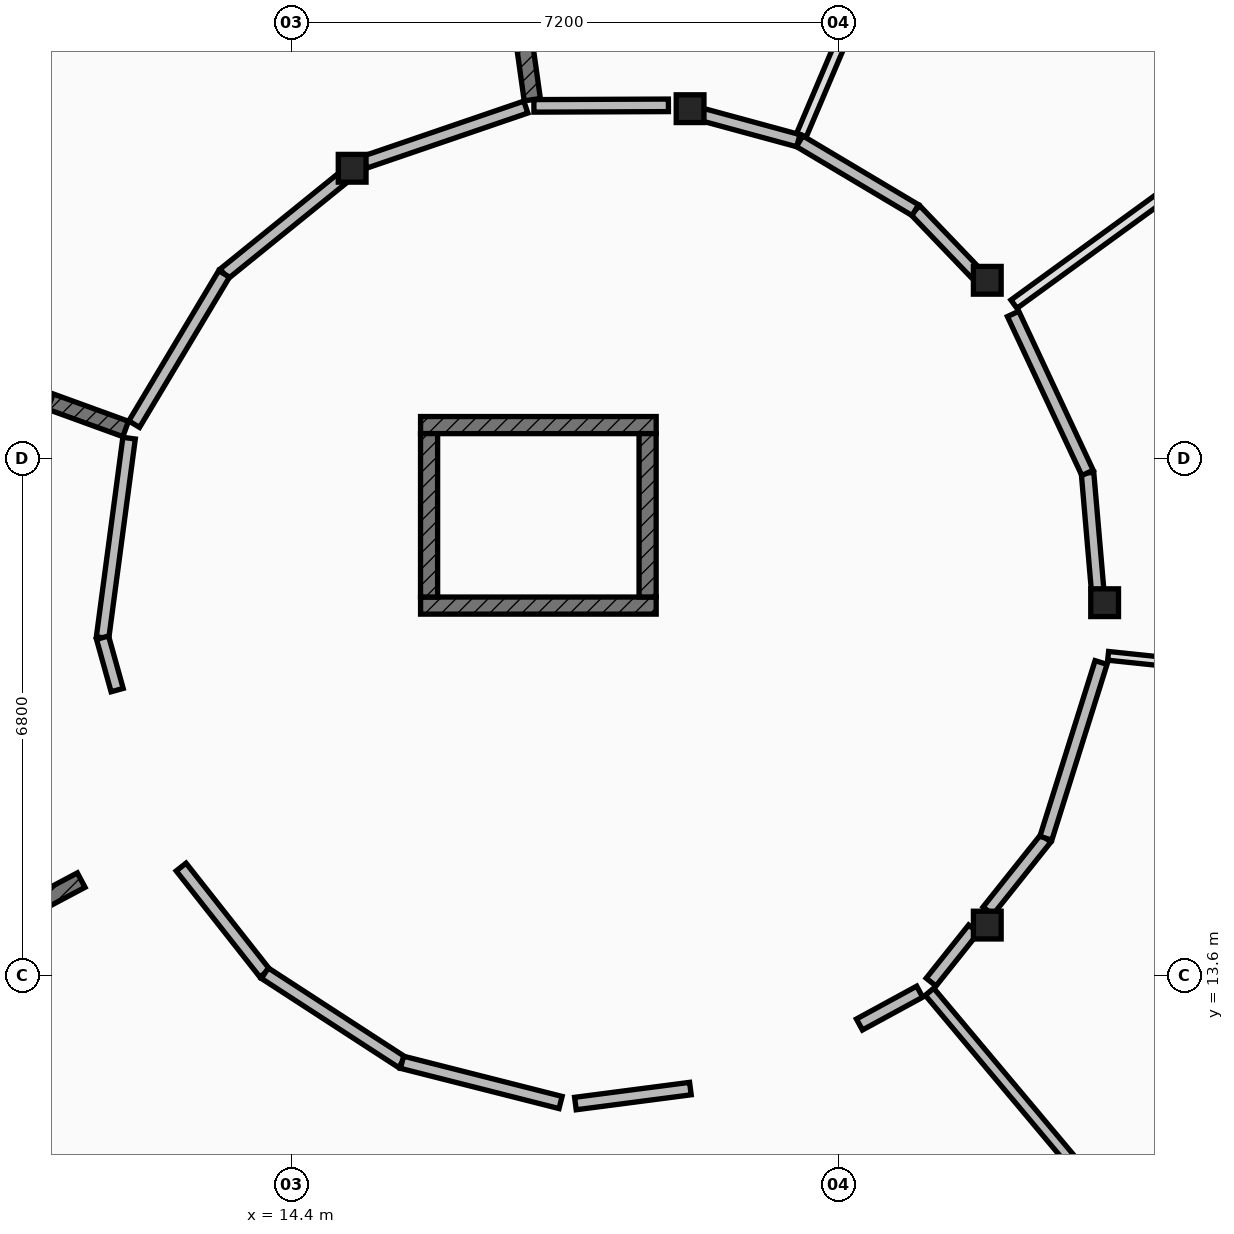
"""IFC4 building model, lengths in metres.
Left out: names, types, materials, properties, quantities, classifications, styles, units other than length and angle.
Written with IfcOpenShell. Run it as: python <this file> out.ifc"""

import sys

from ifc_helpers import new_model, si_unit, direction, frame, frame_2d, origin, origin_2d, place, context, subcontext, project, spatial, rectangle, extrude, element, fill, save


model = new_model("IFC4")
c1 = context("Model", 3, precision=1e-05, world=origin(), true_north=direction((0.0, 1.0)))
c2 = subcontext(c1, "Body", "Model", "MODEL_VIEW")
j1 = project(units=[si_unit("LENGTHUNIT", "METRE"), si_unit("PLANEANGLEUNIT", "RADIAN")], contexts=[c1])
p1 = place(None, origin())
s1 = spatial("IfcSite", under=j1, at=p1, CompositionType="ELEMENT")
p2 = place(p1, origin())
s2 = spatial("IfcBuilding", under=s1, at=p2, CompositionType="ELEMENT")
p3 = place(p2, frame((0.0, 0.0, 8.75)))
s3 = spatial("IfcBuildingStorey", under=s2, at=p3, CompositionType="ELEMENT", Elevation=8.75)
for number, where, z_axis, x_axis in (
    (1, (25.1, 18.5, 0.0), (0.0, 0.0, 1.0), (1.0, 0.0, 0.0)),
    (2, (23.556, 22.742, 0.0), (0.0, 0.0, 1.0), (1.0, 0.0, 0.0)),
    (3, (19.646, 25.0, 0.0), (0.0, 0.0, 1.0), (1.0, 0.0, 0.0)),
    (4, (15.2, 24.216, 0.0), (0.0, 0.0, 1.0), (1.0, 0.0, 0.0)),
    (5, (23.556, 14.258, 0.0), (0.0, 0.0, 1.0), (1.0, 0.0, 0.0)),
):
    element("IfcColumn", number, at=place(p3, frame(where, z_axis=z_axis, x_axis=x_axis)), inside=s3, PredefinedType="COLUMN", context=c2, shape_type="SweptSolid", body=[
        extrude(rectangle(XDim=0.365, YDim=0.365, at=origin_2d()), origin(), (0.0, 0.0, 1.0), 4.2),
    ])
p4 = place(p3, frame((16.1, 18.462, 0.0), z_axis=(0.0, 0.0, 1.0), x_axis=(1.0, 0.0, 0.0)))
e6 = element("IfcWall", 6, at=p4, inside=s3, PredefinedType="SHEAR", context=c2, shape_type="SweptSolid", body=[
    extrude(rectangle(XDim=3.1, YDim=0.225, at=frame_2d((1.55, 0.0))), origin(), (0.0, 0.0, 1.0), 3.975),
])
p5 = place(p4, frame((0.9, 0.0, 0.0)))
e7 = element("IfcOpeningElement", 7, at=p5, cuts=e6, PredefinedType="OPENING", context=c2, shape_type="SweptSolid", body=[
    extrude(rectangle(XDim=1.3, YDim=2.2, at=frame_2d((0.65, 1.1))), frame((0.0, 0.123, 0.0), z_axis=(0.0, -1.0, 0.0), x_axis=(1.0, 0.0, 0.0)), (0.0, 0.0, 1.0), 0.245),
])
p6 = place(p3, frame((16.1, 20.837, 0.0), z_axis=(0.0, 0.0, 1.0), x_axis=(1.0, 0.0, 0.0)))
e8 = element("IfcWall", 8, at=p6, inside=s3, PredefinedType="SHEAR", context=c2, shape_type="SweptSolid", body=[
    extrude(rectangle(XDim=3.1, YDim=0.225, at=frame_2d((1.55, 0.0))), origin(), (0.0, 0.0, 1.0), 3.975),
])
for number, where, z_axis, x_axis in (
    (9, (16.212, 18.575, 0.0), (0.0, 0.0, 1.0), (0.0, 1.0, 0.0)),
    (10, (19.087, 18.575, 0.0), (0.0, 0.0, 1.0), (0.0, 1.0, 0.0)),
):
    element("IfcWall", number, at=place(p3, frame(where, z_axis=z_axis, x_axis=x_axis)), inside=s3, PredefinedType="SHEAR", context=c2, shape_type="SweptSolid", body=[
        extrude(rectangle(XDim=2.15, YDim=0.225, at=frame_2d((1.075, 0.0))), origin(), (0.0, 0.0, 1.0), 3.975),
    ])
p7 = place(p3, frame((17.57, 25.118, 0.0), z_axis=(0.0, 0.0, 1.0), x_axis=(-0.139279606871, 0.990253094471, 0.0)))
e11 = element("IfcWall", 11, at=p7, inside=s3, PredefinedType="SOLIDWALL", context=c2, shape_type="SweptSolid", body=[
    extrude(rectangle(XDim=5.586, YDim=0.215, at=frame_2d((2.793, 0.0))), origin(), (0.0, 0.0, 1.0), 3.304),
])
p8 = place(p3, frame((12.22, 20.786, 0.0), z_axis=(0.0, 0.0, 1.0), x_axis=(-0.939759586286, 0.341836101053, 0.0)))
e12 = element("IfcWall", 12, at=p8, inside=s3, PredefinedType="SOLIDWALL", context=c2, shape_type="SweptSolid", body=[
    extrude(rectangle(XDim=1.053, YDim=0.215, at=frame_2d((0.527, 0.0))), origin(), (0.0, 0.0, 1.0), 3.304),
])
p9 = place(p3, frame((11.635, 14.85, 0.0), z_axis=(0.0, 0.0, 1.0), x_axis=(-0.882922222435, -0.469519274504, 0.0)))
e13 = element("IfcWall", 13, at=p9, inside=s3, PredefinedType="SOLIDWALL", context=c2, shape_type="SweptSolid", body=[
    extrude(rectangle(XDim=4.494, YDim=0.215, at=frame_2d((2.247, 0.0))), origin(), (0.0, 0.0, 1.0), 3.304),
])
p10 = place(p3, frame((22.796, 13.381, 0.0), z_axis=(0.0, 0.0, 1.0), x_axis=(0.642818869514, -0.766018211923, 0.0)))
e14 = element("IfcWall", 14, at=p10, inside=s3, PredefinedType="PARTITIONING", context=c2, shape_type="SweptSolid", body=[
    extrude(rectangle(XDim=5.616, YDim=0.145, at=frame_2d((2.808, 0.0))), origin(), (0.0, 0.0, 1.0), 3.304),
])
p11 = place(p3, frame((25.146, 17.801, 0.0), z_axis=(0.0, 0.0, 1.0), x_axis=(0.994528479097, -0.10446580429, 0.0)))
e15 = element("IfcWall", 15, at=p11, inside=s3, PredefinedType="PARTITIONING", context=c2, shape_type="SweptSolid", body=[
    extrude(rectangle(XDim=5.572, YDim=0.115, at=frame_2d((2.786, 0.0))), origin(), (0.0, 0.0, 1.0), 3.304),
])
p12 = place(p3, frame((23.907, 22.428, 0.0), z_axis=(0.0, 0.0, 1.0), x_axis=(0.808989937146, 0.58782249157, 0.0)))
e16 = element("IfcWall", 16, at=p12, inside=s3, PredefinedType="PLUMBINGWALL", context=c2, shape_type="SweptSolid", body=[
    extrude(rectangle(XDim=5.571, YDim=0.135, at=frame_2d((2.786, 0.0))), origin(), (0.0, 0.0, 1.0), 3.304),
])
p13 = place(p3, frame((21.111, 24.652, 0.0), z_axis=(0.0, 0.0, 1.0), x_axis=(0.390762345339, 0.920491602061, 0.0)))
e17 = element("IfcWall", 17, at=p13, inside=s3, PredefinedType="PLUMBINGWALL", context=c2, shape_type="SweptSolid", body=[
    extrude(rectangle(XDim=5.576, YDim=0.135, at=frame_2d((2.788, 0.0))), origin(), (0.0, 0.0, 1.0), 3.304),
])
p14 = place(p3, frame((17.485, 25.021, 0.0), z_axis=(0.0, 0.0, 1.0), x_axis=(-0.94617630085, -0.323651676514, 0.0)))
e18 = element("IfcWall", 18, at=p14, inside=s3, PredefinedType="PARTITIONING", context=c2, shape_type="SweptSolid", body=[
    extrude(rectangle(XDim=2.237, YDim=0.165, at=frame_2d((1.118, 0.0))), origin(), (0.0, 0.0, 1.0), 3.304),
])
p15 = place(p14, frame((0.393, 0.0, 0.0)))
e19 = element("IfcOpeningElement", 19, at=p15, cuts=e18, PredefinedType="OPENING", context=c2, shape_type="SweptSolid", body=[
    extrude(rectangle(XDim=1.45, YDim=2.28, at=frame_2d((0.725, 1.14))), frame((0.0, 0.093, 0.0), z_axis=(0.0, -1.0, 0.0), x_axis=(1.0, 0.0, 0.0)), (0.0, 0.0, 1.0), 0.185),
])
p16 = place(p3, frame((15.068, 24.083, 0.0), z_axis=(0.0, 0.0, 1.0), x_axis=(-0.777315998558, -0.629110354696, 0.0)))
e20 = element("IfcWall", 20, at=p16, inside=s3, PredefinedType="PARTITIONING", context=c2, shape_type="SweptSolid", body=[
    extrude(rectangle(XDim=1.998, YDim=0.165, at=frame_2d((0.999, 0.0))), origin(), (0.0, 0.0, 1.0), 3.304),
])
p17 = place(p3, frame((13.515, 22.826, 0.0), z_axis=(0.0, 0.0, 1.0), x_axis=(-0.513466768532, -0.858109478804, 0.0)))
e21 = element("IfcWall", 21, at=p17, inside=s3, PredefinedType="PARTITIONING", context=c2, shape_type="SweptSolid", body=[
    extrude(rectangle(XDim=2.304, YDim=0.165, at=frame_2d((1.152, 0.0))), origin(), (0.0, 0.0, 1.0), 3.304),
])
p18 = place(p3, frame((12.265, 20.665, 0.0), z_axis=(0.0, 0.0, 1.0), x_axis=(-0.131747018073, -0.991283371811, 0.0)))
e22 = element("IfcWall", 22, at=p18, inside=s3, PredefinedType="PARTITIONING", context=c2, shape_type="SweptSolid", body=[
    extrude(rectangle(XDim=2.648, YDim=0.165, at=frame_2d((1.324, 0.0))), origin(), (0.0, 0.0, 1.0), 3.304),
])
p19 = place(p18, frame((0.649, 0.0, 0.0)))
e23 = element("IfcOpeningElement", 23, at=p19, cuts=e22, PredefinedType="OPENING", context=c2, shape_type="SweptSolid", body=[
    extrude(rectangle(XDim=1.35, YDim=2.22, at=frame_2d((0.675, 1.11))), frame((0.0, 0.093, 0.0), z_axis=(0.0, -1.0, 0.0), x_axis=(1.0, 0.0, 0.0)), (0.0, 0.0, 1.0), 0.185),
])
p20 = place(p3, frame((11.916, 18.04, 0.0), z_axis=(0.0, 0.0, 1.0), x_axis=(0.267960344866, -0.963429942227, 0.0)))
e24 = element("IfcWall", 24, at=p20, inside=s3, PredefinedType="PARTITIONING", context=c2, shape_type="SweptSolid", body=[
    extrude(rectangle(XDim=0.716, YDim=0.165, at=frame_2d((0.358, 0.0))), origin(), (0.0, 0.0, 1.0), 3.304),
])
p21 = place(p3, frame((12.95, 15.022, 0.0), z_axis=(0.0, 0.0, 1.0), x_axis=(0.619021057701, -0.785374388507, 0.0)))
e25 = element("IfcWall", 25, at=p21, inside=s3, PredefinedType="PARTITIONING", context=c2, shape_type="SweptSolid", body=[
    extrude(rectangle(XDim=1.779, YDim=0.165, at=frame_2d((0.889, 0.0))), origin(), (0.0, 0.0, 1.0), 3.304),
])
p22 = place(p21, frame((0.44, 0.0, 0.0)))
e26 = element("IfcOpeningElement", 26, at=p22, cuts=e25, PredefinedType="OPENING", context=c2, shape_type="SweptSolid", body=[
    extrude(rectangle(XDim=0.9, YDim=2.1, at=frame_2d((0.45, 1.05))), frame((0.0, 0.093, 0.0), z_axis=(0.0, -1.0, 0.0), x_axis=(1.0, 0.0, 0.0)), (0.0, 0.0, 1.0), 0.185),
])
p23 = place(p3, frame((14.051, 13.625, 0.0), z_axis=(0.0, 0.0, 1.0), x_axis=(0.838674212558, -0.544633422763, 0.0)))
e27 = element("IfcWall", 27, at=p23, inside=s3, PredefinedType="PARTITIONING", context=c2, shape_type="SweptSolid", body=[
    extrude(rectangle(XDim=2.152, YDim=0.165, at=frame_2d((1.076, 0.0))), origin(), (0.0, 0.0, 1.0), 3.304),
])
p24 = place(p3, frame((15.856, 12.453, 0.0), z_axis=(0.0, 0.0, 1.0), x_axis=(0.969336371772, -0.245737661664, 0.0)))
e28 = element("IfcWall", 28, at=p24, inside=s3, PredefinedType="PARTITIONING", context=c2, shape_type="SweptSolid", body=[
    extrude(rectangle(XDim=2.152, YDim=0.165, at=frame_2d((1.076, 0.0))), origin(), (0.0, 0.0, 1.0), 3.304),
])
p25 = place(p3, frame((18.137, 11.91, 0.0), z_axis=(0.0, 0.0, 1.0), x_axis=(0.991627158641, 0.129133954659, 0.0)))
e29 = element("IfcWall", 29, at=p25, inside=s3, PredefinedType="PARTITIONING", context=c2, shape_type="SweptSolid", body=[
    extrude(rectangle(XDim=1.526, YDim=0.165, at=frame_2d((0.763, 0.0))), origin(), (0.0, 0.0, 1.0), 3.304),
])
p26 = place(p3, frame((21.874, 12.95, 0.0), z_axis=(0.0, 0.0, 1.0), x_axis=(0.878081476712, 0.478511149563, 0.0)))
e30 = element("IfcWall", 30, at=p26, inside=s3, PredefinedType="PARTITIONING", context=c2, shape_type="SweptSolid", body=[
    extrude(rectangle(XDim=0.903, YDim=0.165, at=frame_2d((0.452, 0.0))), origin(), (0.0, 0.0, 1.0), 3.304),
])
p27 = place(p3, frame((22.817, 13.508, 0.0), z_axis=(0.0, 0.0, 1.0), x_axis=(0.623430420195, 0.781878834076, 0.0)))
e31 = element("IfcWall", 31, at=p27, inside=s3, PredefinedType="PARTITIONING", context=c2, shape_type="SweptSolid", body=[
    extrude(rectangle(XDim=0.895, YDim=0.165, at=frame_2d((0.448, 0.0))), origin(), (0.0, 0.0, 1.0), 3.304),
])
p28 = place(p3, frame((23.565, 14.445, 0.0), z_axis=(0.0, 0.0, 1.0), x_axis=(0.623354481925, 0.781939377359, 0.0)))
e32 = element("IfcWall", 32, at=p28, inside=s3, PredefinedType="PARTITIONING", context=c2, shape_type="SweptSolid", body=[
    extrude(rectangle(XDim=1.222, YDim=0.165, at=frame_2d((0.611, 0.0))), origin(), (0.0, 0.0, 1.0), 3.304),
])
p29 = place(p3, frame((24.327, 15.401, 0.0), z_axis=(0.0, 0.0, 1.0), x_axis=(0.299617014986, 0.954059560159, 0.0)))
e33 = element("IfcWall", 33, at=p29, inside=s3, PredefinedType="PARTITIONING", context=c2, shape_type="SweptSolid", body=[
    extrude(rectangle(XDim=2.423, YDim=0.165, at=frame_2d((1.212, 0.0))), origin(), (0.0, 0.0, 1.0), 3.304),
])
p30 = place(p29, frame((0.621, 0.0, 0.0)))
e34 = element("IfcOpeningElement", 34, at=p30, cuts=e33, PredefinedType="OPENING", context=c2, shape_type="SweptSolid", body=[
    extrude(rectangle(XDim=1.18, YDim=2.2, at=frame_2d((0.59, 1.1))), frame((0.0, 0.093, 0.0), z_axis=(0.0, -1.0, 0.0), x_axis=(1.0, 0.0, 0.0)), (0.0, 0.0, 1.0), 0.185),
])
p31 = place(p3, frame((25.008, 18.663, 0.0), z_axis=(0.0, 0.0, 1.0), x_axis=(-0.085807505565, 0.996311734343, 0.0)))
e35 = element("IfcWall", 35, at=p31, inside=s3, PredefinedType="PARTITIONING", context=c2, shape_type="SweptSolid", body=[
    extrude(rectangle(XDim=1.551, YDim=0.165, at=frame_2d((0.775, 0.0))), origin(), (0.0, 0.0, 1.0), 3.304),
])
p32 = place(p31, frame((0.3, 0.0, 0.0)))
e36 = element("IfcOpeningElement", 36, at=p32, cuts=e35, PredefinedType="OPENING", context=c2, shape_type="SweptSolid", body=[
    extrude(rectangle(XDim=0.95, YDim=2.16, at=frame_2d((0.475, 1.08))), frame((0.0, 0.093, 0.0), z_axis=(0.0, -1.0, 0.0), x_axis=(1.0, 0.0, 0.0)), (0.0, 0.0, 1.0), 0.185),
])
p33 = place(p3, frame((24.875, 20.208, 0.0), z_axis=(0.0, 0.0, 1.0), x_axis=(-0.423851557369, 0.9057316696, 0.0)))
e37 = element("IfcWall", 37, at=p33, inside=s3, PredefinedType="PARTITIONING", context=c2, shape_type="SweptSolid", body=[
    extrude(rectangle(XDim=2.31, YDim=0.165, at=frame_2d((1.155, 0.0))), origin(), (0.0, 0.0, 1.0), 3.304),
])
p34 = place(p3, frame((23.398, 22.842, 0.0), z_axis=(0.0, 0.0, 1.0), x_axis=(-0.692068123198, 0.721832191616, 0.0)))
e38 = element("IfcWall", 38, at=p34, inside=s3, PredefinedType="PARTITIONING", context=c2, shape_type="SweptSolid", body=[
    extrude(rectangle(XDim=1.14, YDim=0.165, at=frame_2d((0.57, 0.0))), origin(), (0.0, 0.0, 1.0), 3.304),
])
p35 = place(p3, frame((22.609, 23.665, 0.0), z_axis=(0.0, 0.0, 1.0), x_axis=(-0.859033212717, 0.511919856471, 0.0)))
e39 = element("IfcWall", 39, at=p35, inside=s3, PredefinedType="PARTITIONING", context=c2, shape_type="SweptSolid", body=[
    extrude(rectangle(XDim=1.772, YDim=0.165, at=frame_2d((0.886, 0.0))), origin(), (0.0, 0.0, 1.0), 3.304),
])
p36 = place(p35, frame((0.435, 0.0, 0.0)))
e40 = element("IfcOpeningElement", 40, at=p36, cuts=e39, PredefinedType="OPENING", context=c2, shape_type="SweptSolid", body=[
    extrude(rectangle(XDim=0.9, YDim=2.1, at=frame_2d((0.45, 1.05))), frame((0.0, 0.093, 0.0), z_axis=(0.0, -1.0, 0.0), x_axis=(1.0, 0.0, 0.0)), (0.0, 0.0, 1.0), 0.185),
])
p37 = place(p3, frame((21.07, 24.579, 0.0), z_axis=(0.0, 0.0, 1.0), x_axis=(-0.965053473757, 0.262053034306, 0.0)))
e41 = element("IfcWall", 41, at=p37, inside=s3, PredefinedType="PARTITIONING", context=c2, shape_type="SweptSolid", body=[
    extrude(rectangle(XDim=1.301, YDim=0.165, at=frame_2d((0.65, 0.0))), origin(), (0.0, 0.0, 1.0), 3.304),
])
p38 = place(p3, frame((19.361, 25.044, 0.0), z_axis=(0.0, 0.0, 1.0), x_axis=(-0.999992542295, -0.003862040163, 0.0)))
e42 = element("IfcWall", 42, at=p38, inside=s3, PredefinedType="PARTITIONING", context=c2, shape_type="SweptSolid", body=[
    extrude(rectangle(XDim=1.77, YDim=0.165, at=frame_2d((0.885, 0.0))), origin(), (0.0, 0.0, 1.0), 3.304),
])
p39 = place(p38, frame((0.415, 0.0, 0.0)))
e43 = element("IfcOpeningElement", 43, at=p39, cuts=e42, PredefinedType="OPENING", context=c2, shape_type="SweptSolid", body=[
    extrude(rectangle(XDim=0.94, YDim=2.1, at=frame_2d((0.47, 1.05))), frame((0.0, 0.093, 0.0), z_axis=(0.0, -1.0, 0.0), x_axis=(1.0, 0.0, 0.0)), (0.0, 0.0, 1.0), 0.185),
])
p40 = place(p5, origin())
e44 = element("IfcDoor", 44, at=p40, inside=s3, OperationType="DOUBLE_DOOR_SLIDING", PredefinedType="DOOR", context=c2, shape_type="SweptSolid", body=[
    extrude(rectangle(XDim=1.3, YDim=2.2, at=frame_2d((0.65, 1.1))), frame((0.0, 0.025, 0.0), z_axis=(0.0, -1.0, 0.0), x_axis=(1.0, 0.0, 0.0)), (0.0, 0.0, 1.0), 0.05),
])
fill(e7, e44)
p41 = place(p15, origin())
e45 = element("IfcDoor", 45, at=p41, inside=s3, OperationType="SINGLE_SWING_RIGHT", PredefinedType="DOOR", context=c2, shape_type="SweptSolid", body=[
    extrude(rectangle(XDim=1.45, YDim=2.28, at=frame_2d((0.725, 1.14))), frame((0.0, 0.025, 0.0), z_axis=(0.0, -1.0, 0.0), x_axis=(1.0, 0.0, 0.0)), (0.0, 0.0, 1.0), 0.05),
])
fill(e19, e45)
p42 = place(p19, origin())
e46 = element("IfcDoor", 46, at=p42, inside=s3, OperationType="SINGLE_SWING_LEFT", PredefinedType="DOOR", context=c2, shape_type="SweptSolid", body=[
    extrude(rectangle(XDim=1.35, YDim=2.22, at=frame_2d((0.675, 1.11))), frame((0.0, 0.025, 0.0), z_axis=(0.0, -1.0, 0.0), x_axis=(1.0, 0.0, 0.0)), (0.0, 0.0, 1.0), 0.05),
])
fill(e23, e46)
p43 = place(p22, origin())
e47 = element("IfcDoor", 47, at=p43, inside=s3, OperationType="SINGLE_SWING_RIGHT", PredefinedType="DOOR", context=c2, shape_type="SweptSolid", body=[
    extrude(rectangle(XDim=0.9, YDim=2.1, at=frame_2d((0.45, 1.05))), frame((0.0, 0.025, 0.0), z_axis=(0.0, -1.0, 0.0), x_axis=(1.0, 0.0, 0.0)), (0.0, 0.0, 1.0), 0.05),
])
fill(e26, e47)
p44 = place(p30, origin())
e48 = element("IfcDoor", 48, at=p44, inside=s3, OperationType="SINGLE_SWING_LEFT", PredefinedType="DOOR", context=c2, shape_type="SweptSolid", body=[
    extrude(rectangle(XDim=1.18, YDim=2.2, at=frame_2d((0.59, 1.1))), frame((0.0, 0.025, 0.0), z_axis=(0.0, -1.0, 0.0), x_axis=(1.0, 0.0, 0.0)), (0.0, 0.0, 1.0), 0.05),
])
fill(e34, e48)
p45 = place(p32, origin())
e49 = element("IfcDoor", 49, at=p45, inside=s3, OperationType="SINGLE_SWING_RIGHT", PredefinedType="DOOR", context=c2, shape_type="SweptSolid", body=[
    extrude(rectangle(XDim=0.95, YDim=2.16, at=frame_2d((0.475, 1.08))), frame((0.0, 0.025, 0.0), z_axis=(0.0, -1.0, 0.0), x_axis=(1.0, 0.0, 0.0)), (0.0, 0.0, 1.0), 0.05),
])
fill(e36, e49)
p46 = place(p36, origin())
e50 = element("IfcDoor", 50, at=p46, inside=s3, OperationType="SINGLE_SWING_LEFT", PredefinedType="DOOR", context=c2, shape_type="SweptSolid", body=[
    extrude(rectangle(XDim=0.9, YDim=2.1, at=frame_2d((0.45, 1.05))), frame((0.0, 0.025, 0.0), z_axis=(0.0, -1.0, 0.0), x_axis=(1.0, 0.0, 0.0)), (0.0, 0.0, 1.0), 0.05),
])
fill(e40, e50)
p47 = place(p39, origin())
e51 = element("IfcDoor", 51, at=p47, inside=s3, OperationType="SINGLE_SWING_RIGHT", PredefinedType="DOOR", context=c2, shape_type="SweptSolid", body=[
    extrude(rectangle(XDim=0.94, YDim=2.1, at=frame_2d((0.47, 1.05))), frame((0.0, 0.025, 0.0), z_axis=(0.0, -1.0, 0.0), x_axis=(1.0, 0.0, 0.0)), (0.0, 0.0, 1.0), 0.05),
])
fill(e43, e51)
save(model, sys.argv[1])
